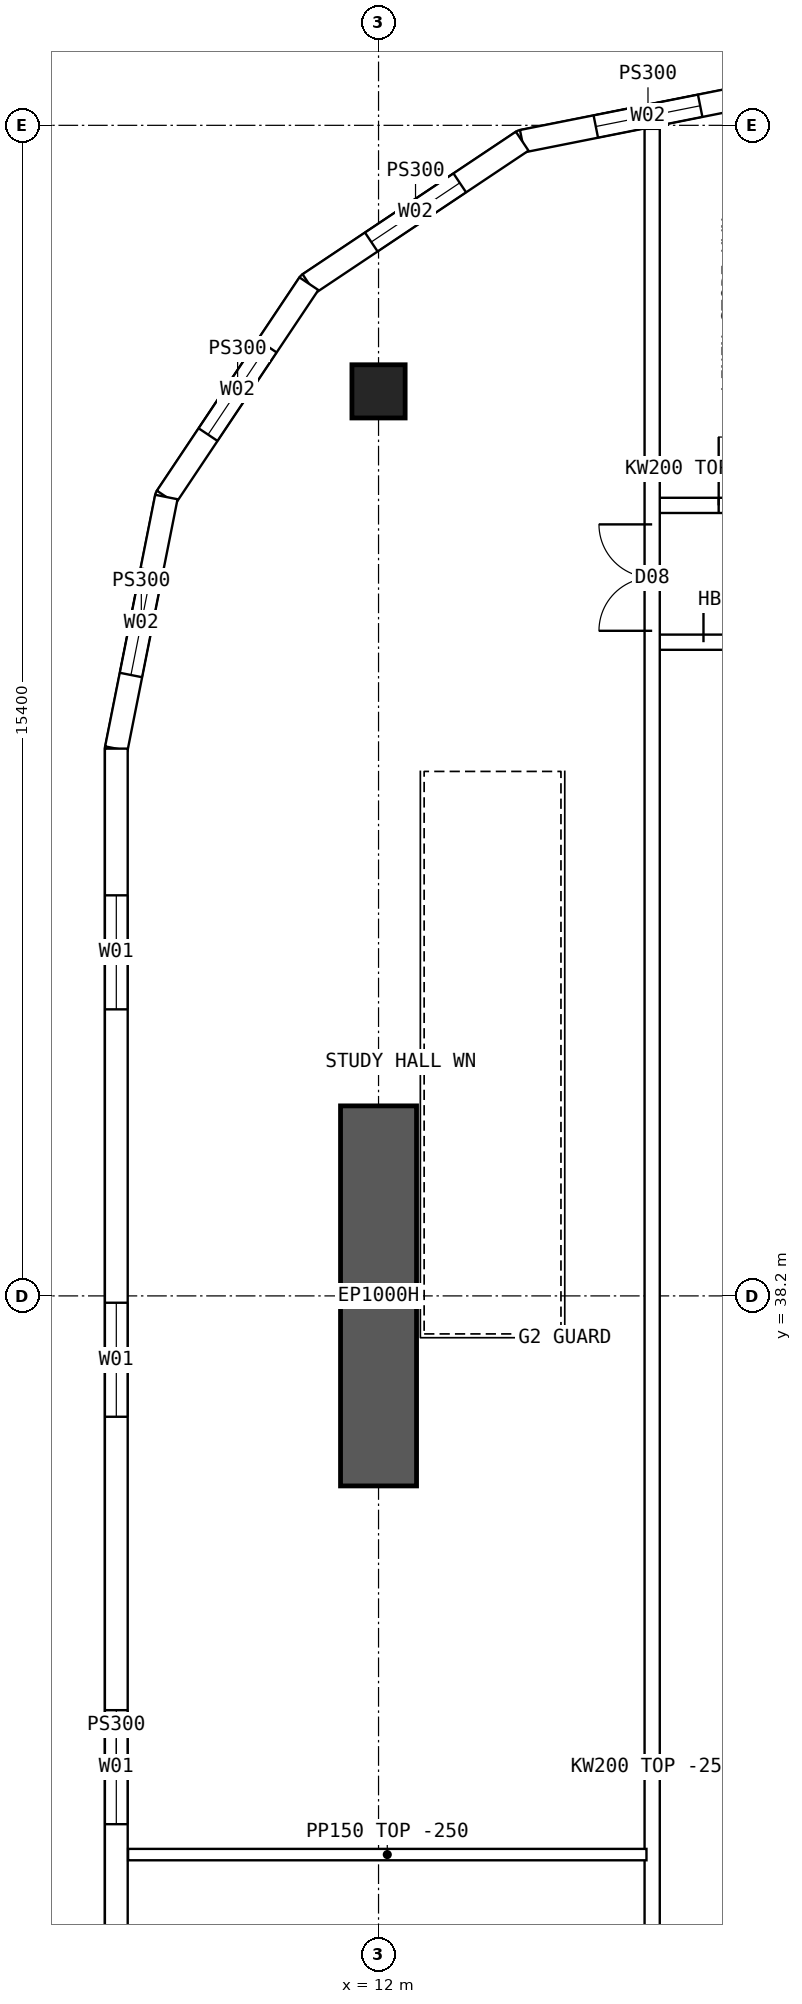
"""IFC4 building model, lengths in metres.
Left out: names, types, materials, properties, quantities, classifications, styles, units other than length and angle.
Written with IfcOpenShell. Run it as: python <this file> out.ifc"""

import sys

from ifc_helpers import new_model, si_unit, direction, frame, frame_2d, origin, origin_2d, place, context, subcontext, project, spatial, polyline, rectangle, hollow_rectangle, outline, extrude, element, fill, save


model = new_model("IFC4")
c1 = context("Model", 3, precision=1e-05, world=origin(), true_north=direction((0.0, 1.0)))
c2 = subcontext(c1, "Body", "Model", "MODEL_VIEW")
j1 = project(units=[si_unit("LENGTHUNIT", "METRE"), si_unit("PLANEANGLEUNIT", "RADIAN")], contexts=[c1])
p1 = place(None, origin())
s1 = spatial("IfcSite", under=j1, at=p1, CompositionType="ELEMENT")
p2 = place(p1, origin())
s2 = spatial("IfcBuilding", under=s1, at=p2, CompositionType="ELEMENT")
p3 = place(p2, frame((0.0, 0.0, 167.35)))
s3 = spatial("IfcBuildingStorey", under=s2, at=p3, CompositionType="ELEMENT", Elevation=167.35)
p4 = place(p3, frame((12.0, 50.1, 0.0), z_axis=(0.0, 0.0, 1.0), x_axis=(1.0, 0.0, 0.0)))
e1 = element("IfcColumn", 1, at=p4, inside=s3, PredefinedType="COLUMN", context=c2, shape_type="SweptSolid", body=[
    extrude(hollow_rectangle(XDim=0.7, YDim=0.7, WallThickness=0.07, at=origin_2d()), origin(), (0.0, 0.0, 1.0), 3.75),
])
p5 = place(p3, frame((12.0, 35.7, 0.0), z_axis=(0.0, 0.0, 1.0), x_axis=(0.0, 1.0, 0.0)))
e2 = element("IfcWall", 2, at=p5, inside=s3, PredefinedType="SHEAR", context=c2, shape_type="SweptSolid", body=[
    extrude(rectangle(XDim=5.0, YDim=1.0, at=frame_2d((2.5, 0.0))), origin(), (0.0, 0.0, 1.0), 3.75),
])
p6 = place(p3, frame((8.55, 45.4, 0.0), z_axis=(0.0, 0.0, 1.0), x_axis=(0.0, -1.0, 0.0)))
e3 = element("IfcWall", 3, at=p6, inside=s3, PredefinedType="SOLIDWALL", context=c2, shape_type="SweptSolid", body=[
    extrude(outline(polyline([(-0.015, -0.15), (26.815, -0.15), (26.785, 0.15), (0.015, 0.15), (-0.015, -0.15)])), origin(), (0.0, 0.0, 1.0), 3.5),
])
p7 = place(p6, frame((1.93, 0.0, 0.9)))
e4 = element("IfcOpeningElement", 4, at=p7, cuts=e3, PredefinedType="OPENING", context=c2, shape_type="SweptSolid", body=[
    extrude(rectangle(XDim=1.5, YDim=2.0, at=frame_2d((0.75, 1.0))), frame((0.0, 0.16, 0.0), z_axis=(0.0, -1.0, 0.0), x_axis=(1.0, 0.0, 0.0)), (0.0, 0.0, 1.0), 0.32),
])
p8 = place(p6, frame((7.29, 0.0, 0.9)))
e5 = element("IfcOpeningElement", 5, at=p8, cuts=e3, PredefinedType="OPENING", context=c2, shape_type="SweptSolid", body=[
    extrude(rectangle(XDim=1.5, YDim=2.0, at=frame_2d((0.75, 1.0))), frame((0.0, 0.16, 0.0), z_axis=(0.0, -1.0, 0.0), x_axis=(1.0, 0.0, 0.0)), (0.0, 0.0, 1.0), 0.32),
])
p9 = place(p6, frame((12.65, 0.0, 0.9)))
e6 = element("IfcOpeningElement", 6, at=p9, cuts=e3, PredefinedType="OPENING", context=c2, shape_type="SweptSolid", body=[
    extrude(rectangle(XDim=1.5, YDim=2.0, at=frame_2d((0.75, 1.0))), frame((0.0, 0.16, 0.0), z_axis=(0.0, -1.0, 0.0), x_axis=(1.0, 0.0, 0.0)), (0.0, 0.0, 1.0), 0.32),
])
p10 = place(p6, frame((18.01, 0.0, 0.9)))
e7 = element("IfcOpeningElement", 7, at=p10, cuts=e3, PredefinedType="OPENING", context=c2, shape_type="SweptSolid", body=[
    extrude(rectangle(XDim=1.5, YDim=2.0, at=frame_2d((0.75, 1.0))), frame((0.0, 0.16, 0.0), z_axis=(0.0, -1.0, 0.0), x_axis=(1.0, 0.0, 0.0)), (0.0, 0.0, 1.0), 0.32),
])
p11 = place(p6, frame((23.37, 0.0, 0.9)))
e8 = element("IfcOpeningElement", 8, at=p11, cuts=e3, PredefinedType="OPENING", context=c2, shape_type="SweptSolid", body=[
    extrude(rectangle(XDim=1.5, YDim=2.0, at=frame_2d((0.75, 1.0))), frame((0.0, 0.16, 0.0), z_axis=(0.0, -1.0, 0.0), x_axis=(1.0, 0.0, 0.0)), (0.0, 0.0, 1.0), 0.32),
])
p12 = place(p3, frame((17.2, 54.05, 0.0), z_axis=(0.0, 0.0, 1.0), x_axis=(-0.98078325777, -0.195100490205, 0.0)))
e9 = element("IfcWall", 9, at=p12, inside=s3, PredefinedType="SOLIDWALL", context=c2, shape_type="SweptSolid", body=[
    extrude(outline(polyline([(-0.03, -0.15), (3.405, -0.15), (3.345, 0.15), (0.03, 0.15), (-0.03, -0.15)])), origin(), (0.0, 0.0, 1.0), 3.5),
])
p13 = place(p12, frame((0.988, 0.0, 0.9)))
e10 = element("IfcOpeningElement", 10, at=p13, cuts=e9, PredefinedType="OPENING", context=c2, shape_type="SweptSolid", body=[
    extrude(rectangle(XDim=1.4, YDim=1.8, at=frame_2d((0.7, 0.9))), frame((0.0, 0.16, 0.0), z_axis=(0.0, -1.0, 0.0), x_axis=(1.0, 0.0, 0.0)), (0.0, 0.0, 1.0), 0.32),
])
p14 = place(p3, frame((13.89, 53.392, 0.0), z_axis=(0.0, 0.0, 1.0), x_axis=(-0.831493450887, -0.555534554399, 0.0)))
e11 = element("IfcWall", 11, at=p14, inside=s3, PredefinedType="SOLIDWALL", context=c2, shape_type="SweptSolid", body=[
    extrude(outline(polyline([(-0.03, -0.15), (3.405, -0.15), (3.345, 0.15), (0.03, 0.15), (-0.03, -0.15)])), origin(), (0.0, 0.0, 1.0), 3.5),
])
p15 = place(p14, frame((0.988, 0.0, 0.9)))
e12 = element("IfcOpeningElement", 12, at=p15, cuts=e11, PredefinedType="OPENING", context=c2, shape_type="SweptSolid", body=[
    extrude(rectangle(XDim=1.4, YDim=1.8, at=frame_2d((0.7, 0.9))), frame((0.0, 0.16, 0.0), z_axis=(0.0, -1.0, 0.0), x_axis=(1.0, 0.0, 0.0)), (0.0, 0.0, 1.0), 0.32),
])
p16 = place(p3, frame((11.083, 51.517, 0.0), z_axis=(0.0, 0.0, 1.0), x_axis=(-0.555534554399, -0.831493450887, 0.0)))
e13 = element("IfcWall", 13, at=p16, inside=s3, PredefinedType="SOLIDWALL", context=c2, shape_type="SweptSolid", body=[
    extrude(outline(polyline([(-0.03, -0.15), (3.405, -0.15), (3.345, 0.15), (0.03, 0.15), (-0.03, -0.15)])), origin(), (0.0, 0.0, 1.0), 3.5),
])
p17 = place(p16, frame((0.988, 0.0, 0.9)))
e14 = element("IfcOpeningElement", 14, at=p17, cuts=e13, PredefinedType="OPENING", context=c2, shape_type="SweptSolid", body=[
    extrude(rectangle(XDim=1.4, YDim=1.8, at=frame_2d((0.7, 0.9))), frame((0.0, 0.16, 0.0), z_axis=(0.0, -1.0, 0.0), x_axis=(1.0, 0.0, 0.0)), (0.0, 0.0, 1.0), 0.32),
])
p18 = place(p3, frame((9.208, 48.71, 0.0), z_axis=(0.0, 0.0, 1.0), x_axis=(-0.19508664885, -0.980786011034, 0.0)))
e15 = element("IfcWall", 15, at=p18, inside=s3, PredefinedType="SOLIDWALL", context=c2, shape_type="SweptSolid", body=[
    extrude(outline(polyline([(-0.03, -0.15), (3.39, -0.15), (3.36, 0.15), (0.03, 0.15), (-0.03, -0.15)])), origin(), (0.0, 0.0, 1.0), 3.5),
])
p19 = place(p18, frame((0.988, 0.0, 0.9)))
e16 = element("IfcOpeningElement", 16, at=p19, cuts=e15, PredefinedType="OPENING", context=c2, shape_type="SweptSolid", body=[
    extrude(rectangle(XDim=1.4, YDim=1.8, at=frame_2d((0.7, 0.9))), frame((0.0, 0.16, 0.0), z_axis=(0.0, -1.0, 0.0), x_axis=(1.0, 0.0, 0.0)), (0.0, 0.0, 1.0), 0.32),
])
p20 = place(p3, frame((15.6, 48.6, 0.0), z_axis=(0.0, 0.0, 1.0), x_axis=(1.0, 0.0, 0.0)))
e17 = element("IfcWall", 17, at=p20, inside=s3, PredefinedType="SOLIDWALL", context=c2, shape_type="SweptSolid", body=[
    extrude(rectangle(XDim=1.975, YDim=0.2, at=frame_2d((0.987, 0.0))), origin(), (0.0, 0.0, 1.0), 3.5),
])
p21 = place(p20, frame((0.875, 0.0, 0.0)))
e18 = element("IfcOpeningElement", 18, at=p21, cuts=e17, PredefinedType="OPENING", context=c2, shape_type="SweptSolid", body=[
    extrude(rectangle(XDim=0.9, YDim=2.1, at=frame_2d((0.45, 1.05))), frame((0.0, 0.11, 0.0), z_axis=(0.0, -1.0, 0.0), x_axis=(1.0, 0.0, 0.0)), (0.0, 0.0, 1.0), 0.22),
])
p22 = place(p3, frame((15.6, 46.8, 0.0), z_axis=(0.0, 0.0, 1.0), x_axis=(1.0, 0.0, 0.0)))
e19 = element("IfcWall", 19, at=p22, inside=s3, PredefinedType="SOLIDWALL", context=c2, shape_type="SweptSolid", body=[
    extrude(rectangle(XDim=1.975, YDim=0.2, at=frame_2d((0.987, 0.0))), origin(), (0.0, 0.0, 1.0), 3.5),
])
p23 = place(p22, frame((0.675, 0.0, 0.0)))
e20 = element("IfcOpeningElement", 20, at=p23, cuts=e19, PredefinedType="OPENING", context=c2, shape_type="SweptSolid", body=[
    extrude(rectangle(XDim=1.2, YDim=2.1, at=frame_2d((0.6, 1.05))), frame((0.0, 0.11, 0.0), z_axis=(0.0, -1.0, 0.0), x_axis=(1.0, 0.0, 0.0)), (0.0, 0.0, 1.0), 0.22),
])
p24 = place(p3, frame((8.705, 30.85, 0.0), z_axis=(0.0, 0.0, 1.0), x_axis=(1.0, 0.0, 0.0)))
e21 = element("IfcWall", 21, at=p24, inside=s3, PredefinedType="PARTITIONING", context=c2, shape_type="SweptSolid", body=[
    extrude(outline(polyline([(0.0, 0.0), (6.82, 0.0), (6.82, 3.5), (3.597, 3.5), (3.595, 3.05), (2.997, 3.05), (2.995, 3.5), (0.0, 3.5), (0.0, 0.0)])), frame((0.0, 0.075, 0.0), z_axis=(0.0, -1.0, 0.0), x_axis=(1.0, 0.0, 0.0)), (0.0, 0.0, 1.0), 0.15),
])
p25 = place(p3, frame((15.6, 10.446, 0.0), z_axis=(0.0, 0.0, 1.0), x_axis=(0.0, 1.0, 0.0)))
e22 = element("IfcWall", 22, at=p25, inside=s3, PredefinedType="SOLIDWALL", context=c2, shape_type="SweptSolid", body=[
    extrude(rectangle(XDim=43.107, YDim=0.2, at=frame_2d((21.554, 0.0))), origin(), (0.0, 0.0, 1.0), 3.5),
])
p26 = place(p25, frame((13.914, 0.0, 0.0)))
e23 = element("IfcOpeningElement", 23, at=p26, cuts=e22, PredefinedType="OPENING", context=c2, shape_type="SweptSolid", body=[
    extrude(rectangle(XDim=1.2, YDim=2.1, at=frame_2d((0.6, 1.05))), frame((0.0, 0.11, 0.0), z_axis=(0.0, -1.0, 0.0), x_axis=(1.0, 0.0, 0.0)), (0.0, 0.0, 1.0), 0.22),
])
p27 = place(p25, frame((5.104, 0.0, 0.0)))
e24 = element("IfcOpeningElement", 24, at=p27, cuts=e22, PredefinedType="OPENING", context=c2, shape_type="SweptSolid", body=[
    extrude(rectangle(XDim=1.4, YDim=2.1, at=frame_2d((0.7, 1.05))), frame((0.0, 0.11, 0.0), z_axis=(0.0, -1.0, 0.0), x_axis=(1.0, 0.0, 0.0)), (0.0, 0.0, 1.0), 0.22),
])
p28 = place(p25, frame((36.504, 0.0, 0.0)))
e25 = element("IfcOpeningElement", 25, at=p28, cuts=e22, PredefinedType="OPENING", context=c2, shape_type="SweptSolid", body=[
    extrude(rectangle(XDim=1.4, YDim=2.1, at=frame_2d((0.7, 1.05))), frame((0.0, 0.11, 0.0), z_axis=(0.0, -1.0, 0.0), x_axis=(1.0, 0.0, 0.0)), (0.0, 0.0, 1.0), 0.22),
])
p29 = place(p7, origin())
e26 = element("IfcWindow", 26, at=p29, inside=s3, PartitioningType="SINGLE_PANEL", PredefinedType="WINDOW", context=c2, shape_type="SweptSolid", body=[
    extrude(rectangle(XDim=1.5, YDim=2.0, at=frame_2d((0.75, 1.0))), frame((0.0, 0.03, 0.0), z_axis=(0.0, -1.0, 0.0), x_axis=(1.0, 0.0, 0.0)), (0.0, 0.0, 1.0), 0.06),
])
fill(e4, e26)
p30 = place(p8, origin())
e27 = element("IfcWindow", 27, at=p30, inside=s3, PartitioningType="SINGLE_PANEL", PredefinedType="WINDOW", context=c2, shape_type="SweptSolid", body=[
    extrude(rectangle(XDim=1.5, YDim=2.0, at=frame_2d((0.75, 1.0))), frame((0.0, 0.03, 0.0), z_axis=(0.0, -1.0, 0.0), x_axis=(1.0, 0.0, 0.0)), (0.0, 0.0, 1.0), 0.06),
])
fill(e5, e27)
p31 = place(p9, origin())
e28 = element("IfcWindow", 28, at=p31, inside=s3, PartitioningType="SINGLE_PANEL", PredefinedType="WINDOW", context=c2, shape_type="SweptSolid", body=[
    extrude(rectangle(XDim=1.5, YDim=2.0, at=frame_2d((0.75, 1.0))), frame((0.0, 0.03, 0.0), z_axis=(0.0, -1.0, 0.0), x_axis=(1.0, 0.0, 0.0)), (0.0, 0.0, 1.0), 0.06),
])
fill(e6, e28)
p32 = place(p13, origin())
e29 = element("IfcWindow", 29, at=p32, inside=s3, PartitioningType="SINGLE_PANEL", PredefinedType="WINDOW", context=c2, shape_type="SweptSolid", body=[
    extrude(rectangle(XDim=1.4, YDim=1.8, at=frame_2d((0.7, 0.9))), frame((0.0, 0.03, 0.0), z_axis=(0.0, -1.0, 0.0), x_axis=(1.0, 0.0, 0.0)), (0.0, 0.0, 1.0), 0.06),
])
fill(e10, e29)
p33 = place(p15, origin())
e30 = element("IfcWindow", 30, at=p33, inside=s3, PartitioningType="SINGLE_PANEL", PredefinedType="WINDOW", context=c2, shape_type="SweptSolid", body=[
    extrude(rectangle(XDim=1.4, YDim=1.8, at=frame_2d((0.7, 0.9))), frame((0.0, 0.03, 0.0), z_axis=(0.0, -1.0, 0.0), x_axis=(1.0, 0.0, 0.0)), (0.0, 0.0, 1.0), 0.06),
])
fill(e12, e30)
p34 = place(p17, origin())
e31 = element("IfcWindow", 31, at=p34, inside=s3, PartitioningType="SINGLE_PANEL", PredefinedType="WINDOW", context=c2, shape_type="SweptSolid", body=[
    extrude(rectangle(XDim=1.4, YDim=1.8, at=frame_2d((0.7, 0.9))), frame((0.0, 0.03, 0.0), z_axis=(0.0, -1.0, 0.0), x_axis=(1.0, 0.0, 0.0)), (0.0, 0.0, 1.0), 0.06),
])
fill(e14, e31)
p35 = place(p19, origin())
e32 = element("IfcWindow", 32, at=p35, inside=s3, PartitioningType="SINGLE_PANEL", PredefinedType="WINDOW", context=c2, shape_type="SweptSolid", body=[
    extrude(rectangle(XDim=1.4, YDim=1.8, at=frame_2d((0.7, 0.9))), frame((0.0, 0.03, 0.0), z_axis=(0.0, -1.0, 0.0), x_axis=(1.0, 0.0, 0.0)), (0.0, 0.0, 1.0), 0.06),
])
fill(e16, e32)
p36 = place(p23, origin())
e33 = element("IfcDoor", 33, at=p36, inside=s3, OperationType="DOUBLE_DOOR_SINGLE_SWING", PredefinedType="DOOR", context=c2, shape_type="SweptSolid", body=[
    extrude(rectangle(XDim=1.2, YDim=2.1, at=frame_2d((0.6, 1.05))), frame((0.0, 0.025, 0.0), z_axis=(0.0, -1.0, 0.0), x_axis=(1.0, 0.0, 0.0)), (0.0, 0.0, 1.0), 0.05),
])
fill(e20, e33)
p37 = place(p28, origin())
e34 = element("IfcDoor", 34, at=p37, inside=s3, OperationType="DOUBLE_DOOR_SINGLE_SWING", PredefinedType="DOOR", context=c2, shape_type="SweptSolid", body=[
    extrude(rectangle(XDim=1.4, YDim=2.1, at=frame_2d((0.7, 1.05))), frame((0.0, 0.025, 0.0), z_axis=(0.0, -1.0, 0.0), x_axis=(1.0, 0.0, 0.0)), (0.0, 0.0, 1.0), 0.05),
])
fill(e25, e34)
p38 = place(p21, origin())
e35 = element("IfcDoor", 35, at=p38, inside=s3, OperationType="SINGLE_SWING_LEFT", PredefinedType="DOOR", context=c2, shape_type="SweptSolid", body=[
    extrude(rectangle(XDim=0.9, YDim=2.1, at=frame_2d((0.45, 1.05))), frame((0.0, 0.025, 0.0), z_axis=(0.0, -1.0, 0.0), x_axis=(1.0, 0.0, 0.0)), (0.0, 0.0, 1.0), 0.05),
])
fill(e18, e35)
save(model, sys.argv[1])
